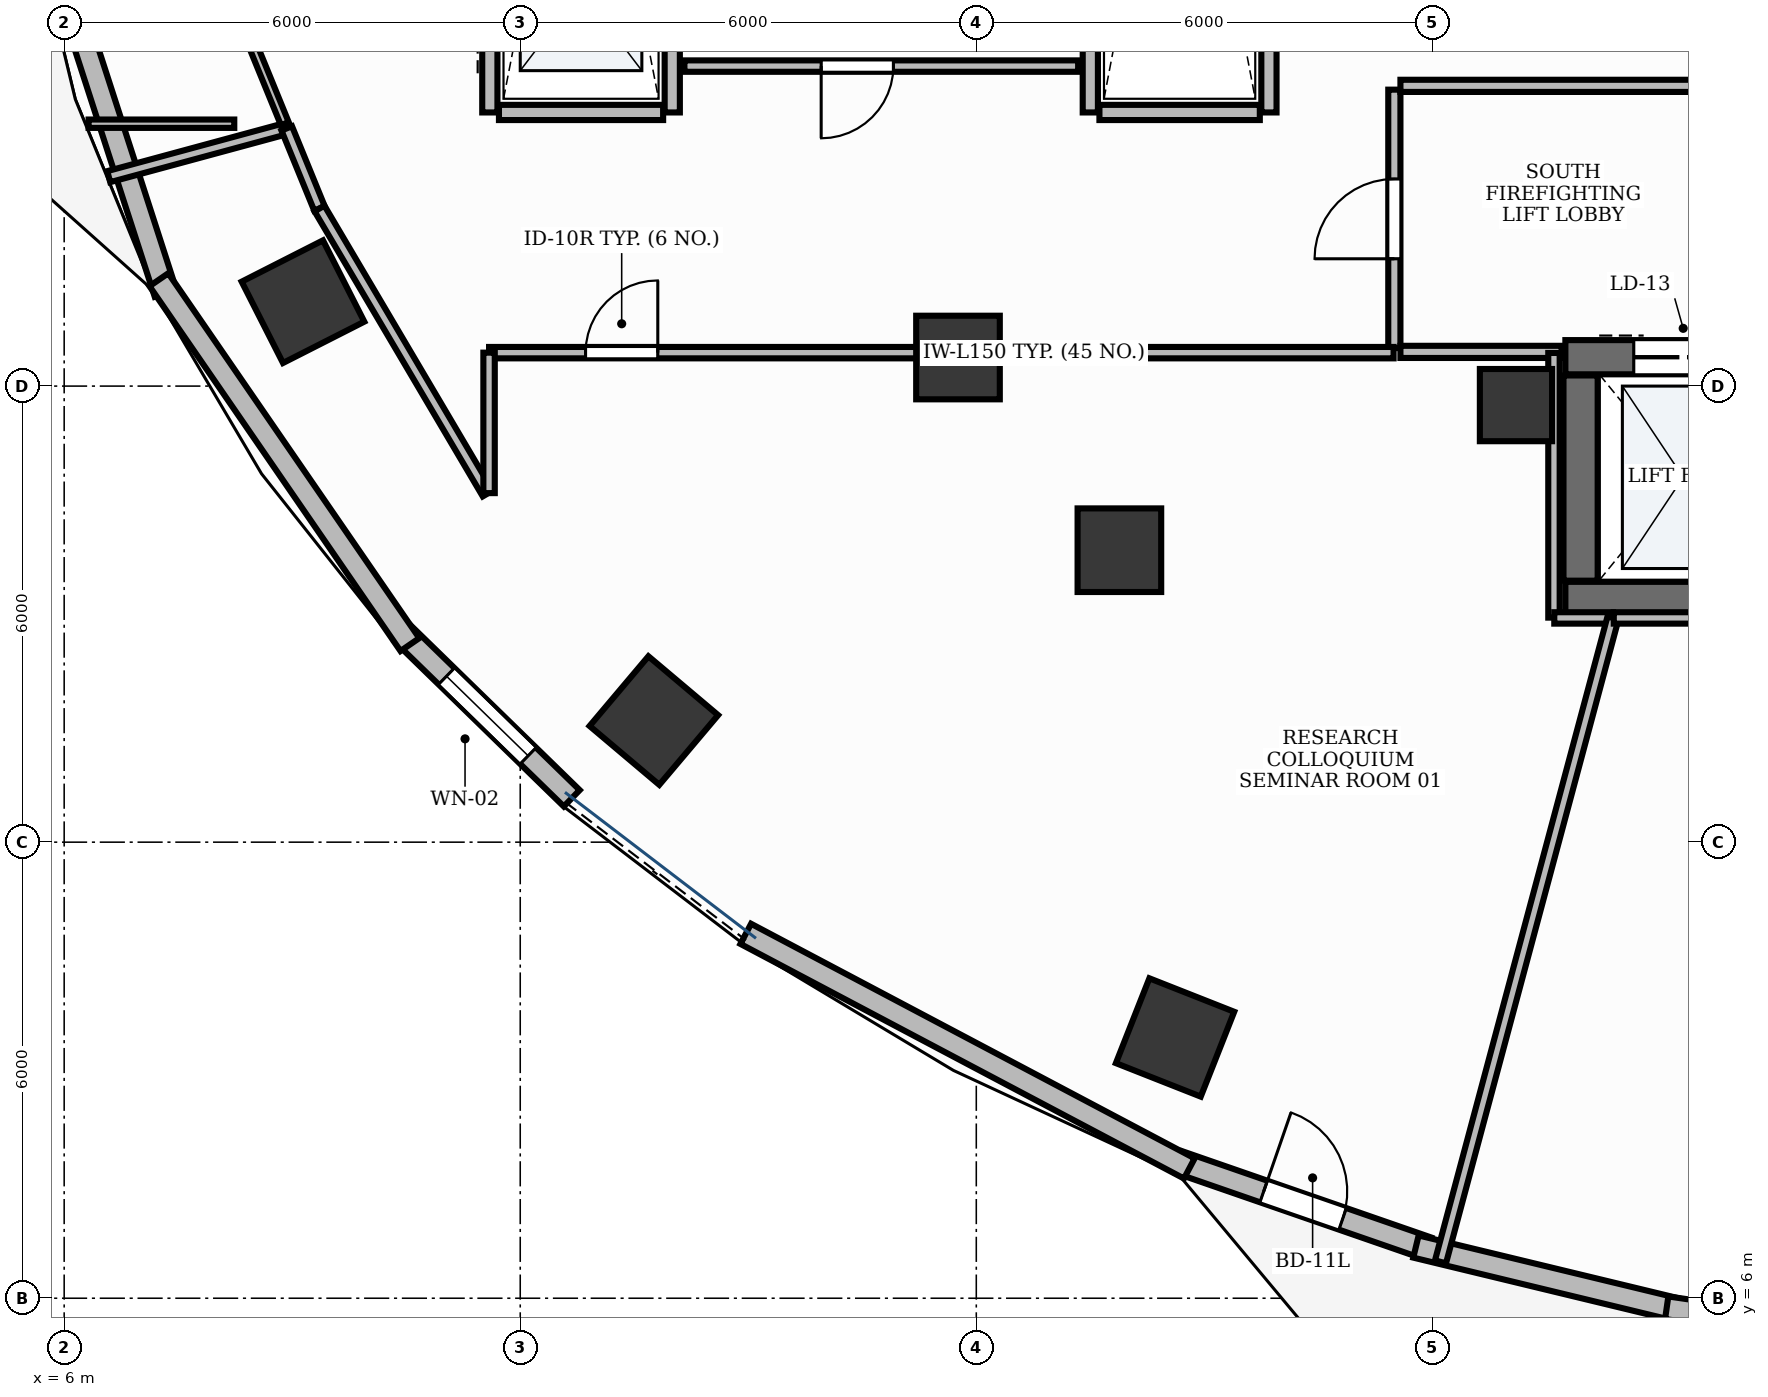
"""IFC4 building model, lengths in metres.
Left out: names, types, materials, properties, quantities, classifications, styles, units other than length and angle.
Written with IfcOpenShell. Run it as: python <this file> out.ifc"""

import sys

from ifc_helpers import new_model, si_unit, direction, frame, frame_2d, origin, origin_2d, place, context, subcontext, project, spatial, rectangle, extrude, element, fill, save


model = new_model("IFC4")
c1 = context("Model", 3, precision=1e-05, world=origin(), true_north=direction((0.0, 1.0)))
c2 = subcontext(c1, "Body", "Model", "MODEL_VIEW")
j1 = project(units=[si_unit("LENGTHUNIT", "METRE"), si_unit("PLANEANGLEUNIT", "RADIAN")], contexts=[c1])
p1 = place(None, origin())
s1 = spatial("IfcSite", under=j1, at=p1, CompositionType="ELEMENT")
p2 = place(p1, origin())
s2 = spatial("IfcBuilding", under=s1, at=p2, CompositionType="ELEMENT")
p3 = place(p2, frame((0.0, 0.0, 106.8)))
s3 = spatial("IfcBuildingStorey", under=s2, at=p3, CompositionType="ELEMENT", Elevation=106.8)
p4 = place(p3, frame((25.75, 15.2, 0.0), z_axis=(0.0, 0.0, 1.0), x_axis=(1.0, 0.0, 0.0)))
e1 = element("IfcWall", 1, at=p4, inside=s3, PredefinedType="SHEAR", context=c2, shape_type="SweptSolid", body=[
    extrude(rectangle(XDim=3.1, YDim=0.45, at=frame_2d((1.55, 0.0))), origin(), (0.0, 0.0, 1.0), 3.9),
])
p5 = place(p3, frame((25.75, 18.38, 0.0), z_axis=(0.0, 0.0, 1.0), x_axis=(1.0, 0.0, 0.0)))
e2 = element("IfcWall", 2, at=p5, inside=s3, PredefinedType="SHEAR", context=c2, shape_type="SweptSolid", body=[
    extrude(rectangle(XDim=3.1, YDim=0.45, at=frame_2d((1.55, 0.0))), origin(), (0.0, 0.0, 1.0), 3.9),
])
p6 = place(p5, frame((0.9, 0.0, 0.0)))
e3 = element("IfcOpeningElement", 3, at=p6, cuts=e2, PredefinedType="OPENING", context=c2, shape_type="SweptSolid", body=[
    extrude(rectangle(XDim=1.3, YDim=2.2, at=frame_2d((0.65, 1.1))), frame((0.0, 0.24, 0.0), z_axis=(0.0, -1.0, 0.0), x_axis=(1.0, 0.0, 0.0)), (0.0, 0.0, 1.0), 0.48),
])
p7 = place(p3, frame((25.95, 15.44, 0.0), z_axis=(0.0, 0.0, 1.0), x_axis=(0.0, 1.0, 0.0)))
e4 = element("IfcWall", 4, at=p7, inside=s3, PredefinedType="SHEAR", context=c2, shape_type="SweptSolid", body=[
    extrude(rectangle(XDim=2.7, YDim=0.45, at=frame_2d((1.35, 0.0))), origin(), (0.0, 0.0, 1.0), 3.9),
])
p8 = place(p3, frame((25.1, 17.75, -0.0), z_axis=(0.0, 0.0, 1.0), x_axis=(1.0, 0.0, 0.0)))
e5 = element("IfcColumn", 5, at=p8, inside=s3, PredefinedType="PILASTER", context=c2, shape_type="SweptSolid", body=[
    extrude(rectangle(XDim=0.95, YDim=0.95, at=origin_2d()), origin(), (0.0, 0.0, 1.0), 3.901),
])
p9 = place(p3, frame((9.142, 19.111, -0.0), z_axis=(0.0, 0.0, 1.0), x_axis=(-0.453057191132, 0.891481453292, 0.0)))
e6 = element("IfcColumn", 6, at=p9, inside=s3, PredefinedType="COLUMN", context=c2, shape_type="SweptSolid", body=[
    extrude(rectangle(XDim=1.2, YDim=1.2, at=origin_2d()), origin(), (0.0, 0.0, 1.0), 3.901),
])
p10 = place(p3, frame((17.759, 18.376, -0.0), z_axis=(0.0, 0.0, 1.0), x_axis=(1.0, 0.0, 0.0)))
e7 = element("IfcColumn", 7, at=p10, inside=s3, PredefinedType="COLUMN", context=c2, shape_type="SweptSolid", body=[
    extrude(rectangle(XDim=1.1, YDim=1.1, at=origin_2d()), origin(), (0.0, 0.0, 1.0), 3.901),
])
p11 = place(p3, frame((13.758, 13.6, -0.0), z_axis=(0.0, 0.0, 1.0), x_axis=(-0.764246456939, 0.644924300253, 0.0)))
e8 = element("IfcColumn", 8, at=p11, inside=s3, PredefinedType="COLUMN", context=c2, shape_type="SweptSolid", body=[
    extrude(rectangle(XDim=1.2, YDim=1.2, at=origin_2d()), origin(), (0.0, 0.0, 1.0), 3.901),
])
p12 = place(p3, frame((19.883, 15.841, -0.0), z_axis=(0.0, 0.0, 1.0), x_axis=(1.0, 0.0, 0.0)))
e9 = element("IfcColumn", 9, at=p12, inside=s3, PredefinedType="COLUMN", context=c2, shape_type="SweptSolid", body=[
    extrude(rectangle(XDim=1.1, YDim=1.1, at=origin_2d()), origin(), (0.0, 0.0, 1.0), 3.901),
])
p13 = place(p3, frame((20.615, 9.431, -0.0), z_axis=(0.0, 0.0, 1.0), x_axis=(-0.930225540858, 0.366988341962, 0.0)))
e10 = element("IfcColumn", 10, at=p13, inside=s3, PredefinedType="COLUMN", context=c2, shape_type="SweptSolid", body=[
    extrude(rectangle(XDim=1.2, YDim=1.2, at=origin_2d()), origin(), (0.0, 0.0, 1.0), 3.901),
])
p14 = place(p3, frame((10.456, 14.743, 0.0), z_axis=(0.0, 0.0, 1.0), x_axis=(0.716099460419, -0.697998254144, 0.0)))
e11 = element("IfcWall", 11, at=p14, inside=s3, PredefinedType="STANDARD", context=c2, shape_type="SweptSolid", body=[
    extrude(rectangle(XDim=3.102, YDim=0.3, at=frame_2d((1.551, 0.0))), origin(), (0.0, 0.0, 1.0), 3.9),
])
p15 = place(p14, frame((0.801, 0.0, 0.95)))
e12 = element("IfcOpeningElement", 12, at=p15, cuts=e11, PredefinedType="OPENING", context=c2, shape_type="SweptSolid", body=[
    extrude(rectangle(XDim=1.5, YDim=1.8, at=frame_2d((0.75, 0.9))), frame((0.0, 0.165, 0.0), z_axis=(0.0, -1.0, 0.0), x_axis=(1.0, 0.0, 0.0)), (0.0, 0.0, 1.0), 0.33),
])
p16 = place(p3, frame((20.662, 7.792, 0.0), z_axis=(0.0, 0.0, 1.0), x_axis=(0.944878029854, -0.3274225232, 0.0)))
e13 = element("IfcWall", 13, at=p16, inside=s3, PredefinedType="STANDARD", context=c2, shape_type="SweptSolid", body=[
    extrude(rectangle(XDim=3.467, YDim=0.3, at=frame_2d((1.734, 0.0))), origin(), (0.0, 0.0, 1.0), 3.47),
])
p17 = place(p16, frame((1.184, 0.0, 0.0)))
e14 = element("IfcOpeningElement", 14, at=p17, cuts=e13, PredefinedType="OPENING", context=c2, shape_type="SweptSolid", body=[
    extrude(rectangle(XDim=1.1, YDim=2.15, at=frame_2d((0.55, 1.075))), frame((0.0, 0.165, 0.0), z_axis=(0.0, -1.0, 0.0), x_axis=(1.0, 0.0, 0.0)), (0.0, 0.0, 1.0), 0.33),
])
p18 = place(p3, frame((5.632, 24.487, 0.0), z_axis=(0.0, 0.0, 1.0), x_axis=(0.307599470659, -0.951515930319, 0.0)))
e15 = element("IfcWall", 15, at=p18, inside=s3, PredefinedType="STANDARD", context=c2, shape_type="SweptSolid", body=[
    extrude(rectangle(XDim=5.534, YDim=0.3, at=frame_2d((2.767, 0.0))), origin(), (0.0, 0.0, 1.0), 3.9),
])
p19 = place(p3, frame((7.246, 19.399, 0.0), z_axis=(0.0, 0.0, 1.0), x_axis=(0.566825798999, -0.823837674296, 0.0)))
e16 = element("IfcWall", 16, at=p19, inside=s3, PredefinedType="STANDARD", context=c2, shape_type="SweptSolid", body=[
    extrude(rectangle(XDim=5.826, YDim=0.3, at=frame_2d((2.913, 0.0))), origin(), (0.0, 0.0, 1.0), 3.9),
])
p20 = place(p3, frame((14.967, 10.794, 0.0), z_axis=(0.0, 0.0, 1.0), x_axis=(0.883986649445, -0.467512142734, 0.0)))
e17 = element("IfcWall", 17, at=p20, inside=s3, PredefinedType="STANDARD", context=c2, shape_type="SweptSolid", body=[
    extrude(rectangle(XDim=6.601, YDim=0.3, at=frame_2d((3.301, 0.0))), origin(), (0.0, 0.0, 1.0), 3.9),
])
p21 = place(p3, frame((23.784, 6.68, 0.0), z_axis=(0.0, 0.0, 1.0), x_axis=(0.972043452321, -0.234801036625, 0.0)))
e18 = element("IfcWall", 18, at=p21, inside=s3, PredefinedType="STANDARD", context=c2, shape_type="SweptSolid", body=[
    extrude(rectangle(XDim=3.569, YDim=0.3, at=frame_2d((1.784, 0.0))), origin(), (0.0, 0.0, 1.0), 3.9),
])
p22 = place(p3, frame((27.083, 5.875, 0.0), z_axis=(0.0, 0.0, 1.0), x_axis=(0.989734732902, -0.142916613754, 0.0)))
e19 = element("IfcWall", 19, at=p22, inside=s3, PredefinedType="STANDARD", context=c2, shape_type="SweptSolid", body=[
    extrude(rectangle(XDim=3.611, YDim=0.3, at=frame_2d((1.806, 0.0))), origin(), (0.0, 0.0, 1.0), 3.47),
])
p23 = place(p3, frame((11.6, 21.6, 0.0), z_axis=(0.0, 0.0, 1.0), x_axis=(0.0, 1.0, 0.0)))
e20 = element("IfcWall", 20, at=p23, inside=s3, PredefinedType="PARTITIONING", context=c2, shape_type="SweptSolid", body=[
    extrude(rectangle(XDim=10.8, YDim=0.2, at=frame_2d((5.4, 0.0))), origin(), (0.0, 0.0, 1.0), 2.91),
])
p24 = place(p23, frame((0.9, 0.0, 0.0)))
e21 = element("IfcOpeningElement", 21, at=p24, cuts=e20, PredefinedType="OPENING", context=c2, shape_type="SweptSolid", body=[
    extrude(rectangle(XDim=1.1, YDim=2.2, at=frame_2d((0.55, 1.1))), frame((0.0, 0.115, 0.0), z_axis=(0.0, -1.0, 0.0), x_axis=(1.0, 0.0, 0.0)), (0.0, 0.0, 1.0), 0.23),
])
p25 = place(p23, frame((3.6, 0.0, 0.0)))
e22 = element("IfcOpeningElement", 22, at=p25, cuts=e20, PredefinedType="OPENING", context=c2, shape_type="SweptSolid", body=[
    extrude(rectangle(XDim=1.1, YDim=2.2, at=frame_2d((0.55, 1.1))), frame((0.0, 0.115, 0.0), z_axis=(0.0, -1.0, 0.0), x_axis=(1.0, 0.0, 0.0)), (0.0, 0.0, 1.0), 0.23),
])
p26 = place(p23, frame((6.3, 0.0, 0.0)))
e23 = element("IfcOpeningElement", 23, at=p26, cuts=e20, PredefinedType="OPENING", context=c2, shape_type="SweptSolid", body=[
    extrude(rectangle(XDim=1.1, YDim=2.2, at=frame_2d((0.55, 1.1))), frame((0.0, 0.115, 0.0), z_axis=(0.0, -1.0, 0.0), x_axis=(1.0, 0.0, 0.0)), (0.0, 0.0, 1.0), 0.23),
])
p27 = place(p23, frame((9.0, 0.0, 0.0)))
e24 = element("IfcOpeningElement", 24, at=p27, cuts=e20, PredefinedType="OPENING", context=c2, shape_type="SweptSolid", body=[
    extrude(rectangle(XDim=1.1, YDim=2.2, at=frame_2d((0.55, 1.1))), frame((0.0, 0.115, 0.0), z_axis=(0.0, -1.0, 0.0), x_axis=(1.0, 0.0, 0.0)), (0.0, 0.0, 1.0), 0.23),
])
p28 = place(p3, frame((14.0, 21.6, 0.0), z_axis=(0.0, 0.0, 1.0), x_axis=(0.0, 1.0, 0.0)))
e25 = element("IfcWall", 25, at=p28, inside=s3, PredefinedType="PARTITIONING", context=c2, shape_type="SweptSolid", body=[
    extrude(rectangle(XDim=10.8, YDim=0.2, at=frame_2d((5.4, 0.0))), origin(), (0.0, 0.0, 1.0), 2.91),
])
p29 = place(p3, frame((11.72, 21.6, 0.0), z_axis=(0.0, 0.0, 1.0), x_axis=(1.0, 0.0, 0.0)))
e26 = element("IfcWall", 26, at=p29, inside=s3, PredefinedType="PARTITIONING", context=c2, shape_type="SweptSolid", body=[
    extrude(rectangle(XDim=2.16, YDim=0.2, at=frame_2d((1.08, 0.0))), origin(), (0.0, 0.0, 1.0), 2.91),
])
for number, where, z_axis, x_axis in (
    (27, (19.5, 21.6, 0.0), (0.0, 0.0, 1.0), (0.0, 1.0, 0.0)),
    (28, (21.85, 21.6, 0.0), (0.0, 0.0, 1.0), (0.0, 1.0, 0.0)),
):
    element("IfcWall", number, at=place(p3, frame(where, z_axis=z_axis, x_axis=x_axis)), inside=s3, PredefinedType="PARTITIONING", context=c2, shape_type="SweptSolid", body=[
        extrude(rectangle(XDim=10.8, YDim=0.2, at=frame_2d((5.4, 0.0))), origin(), (0.0, 0.0, 1.0), 2.91),
    ])
p30 = place(p3, frame((19.62, 21.6, 0.0), z_axis=(0.0, 0.0, 1.0), x_axis=(1.0, 0.0, 0.0)))
e29 = element("IfcWall", 29, at=p30, inside=s3, PredefinedType="PARTITIONING", context=c2, shape_type="SweptSolid", body=[
    extrude(rectangle(XDim=2.11, YDim=0.2, at=frame_2d((1.055, 0.0))), origin(), (0.0, 0.0, 1.0), 2.91),
])
p31 = place(p3, frame((23.5, 18.5, 0.0), z_axis=(0.0, 0.0, 1.0), x_axis=(0.0, 1.0, 0.0)))
e30 = element("IfcWall", 30, at=p31, inside=s3, PredefinedType="PARTITIONING", context=c2, shape_type="SweptSolid", body=[
    extrude(rectangle(XDim=3.4, YDim=0.16, at=frame_2d((1.7, 0.0))), origin(), (0.0, 0.0, 1.0), 2.91),
])
p32 = place(p31, frame((1.175, 0.0, 0.0)))
e31 = element("IfcOpeningElement", 31, at=p32, cuts=e30, PredefinedType="OPENING", context=c2, shape_type="SweptSolid", body=[
    extrude(rectangle(XDim=1.05, YDim=2.15, at=frame_2d((0.525, 1.075))), frame((0.0, 0.095, 0.0), z_axis=(0.0, -1.0, 0.0), x_axis=(1.0, 0.0, 0.0)), (0.0, 0.0, 1.0), 0.19),
])
p33 = place(p3, frame((23.58, 21.95, 0.0), z_axis=(0.0, 0.0, 1.0), x_axis=(1.0, 0.0, 0.0)))
e32 = element("IfcWall", 32, at=p33, inside=s3, PredefinedType="PARTITIONING", context=c2, shape_type="SweptSolid", body=[
    extrude(rectangle(XDim=4.97, YDim=0.16, at=frame_2d((2.485, 0.0))), origin(), (0.0, 0.0, 1.0), 2.91),
])
p34 = place(p3, frame((23.58, 18.45, 0.0), z_axis=(0.0, 0.0, 1.0), x_axis=(1.0, 0.0, 0.0)))
e33 = element("IfcWall", 33, at=p34, inside=s3, PredefinedType="PARTITIONING", context=c2, shape_type="SweptSolid", body=[
    extrude(rectangle(XDim=2.12, YDim=0.16, at=frame_2d((1.06, 0.0))), origin(), (0.0, 0.0, 1.0), 2.91),
])
p35 = place(p3, frame((11.59, 18.44, 0.0), z_axis=(0.0, 0.0, 1.0), x_axis=(1.0, 0.0, 0.0)))
e34 = element("IfcWall", 34, at=p35, inside=s3, PredefinedType="PARTITIONING", context=c2, shape_type="SweptSolid", body=[
    extrude(rectangle(XDim=11.9, YDim=0.15, at=frame_2d((5.95, 0.0))), origin(), (0.0, 0.0, 1.0), 2.91),
])
p36 = place(p35, frame((1.27, 0.0, 0.0)))
e35 = element("IfcOpeningElement", 35, at=p36, cuts=e34, PredefinedType="OPENING", context=c2, shape_type="SweptSolid", body=[
    extrude(rectangle(XDim=0.95, YDim=2.15, at=frame_2d((0.475, 1.075))), frame((0.0, 0.09, 0.0), z_axis=(0.0, -1.0, 0.0), x_axis=(1.0, 0.0, 0.0)), (0.0, 0.0, 1.0), 0.18),
])
p37 = place(p3, frame((19.34, 22.21, 0.0), z_axis=(0.0, 0.0, 1.0), x_axis=(-1.0, 0.0, 0.0)))
e36 = element("IfcWall", 36, at=p37, inside=s3, PredefinedType="PARTITIONING", context=c2, shape_type="SweptSolid", body=[
    extrude(rectangle(XDim=5.18, YDim=0.15, at=frame_2d((2.59, 0.0))), origin(), (0.0, 0.0, 1.0), 2.91),
])
p38 = place(p37, frame((2.431, 0.0, 0.0)))
e37 = element("IfcOpeningElement", 37, at=p38, cuts=e36, PredefinedType="OPENING", context=c2, shape_type="SweptSolid", body=[
    extrude(rectangle(XDim=0.95, YDim=2.15, at=frame_2d((0.475, 1.075))), frame((0.0, 0.09, 0.0), z_axis=(0.0, -1.0, 0.0), x_axis=(1.0, 0.0, 0.0)), (0.0, 0.0, 1.0), 0.18),
])
p39 = place(p3, frame((6.586, 20.756, 0.0), z_axis=(0.0, 0.0, 1.0), x_axis=(0.965171339766, 0.261618586676, 0.0)))
e38 = element("IfcWall", 38, at=p39, inside=s3, PredefinedType="PARTITIONING", context=c2, shape_type="SweptSolid", body=[
    extrude(rectangle(XDim=2.426, YDim=0.15, at=frame_2d((1.213, 0.0))), origin(), (0.0, 0.0, 1.0), 2.91),
])
p40 = place(p3, frame((8.928, 21.39, 0.0), z_axis=(0.0, 0.0, 1.0), x_axis=(0.378373768339, -0.925652900083, 0.0)))
e39 = element("IfcWall", 39, at=p40, inside=s3, PredefinedType="PARTITIONING", context=c2, shape_type="SweptSolid", body=[
    extrude(rectangle(XDim=1.137, YDim=0.15, at=frame_2d((0.569, 0.0))), origin(), (0.0, 0.0, 1.0), 2.91),
])
p41 = place(p3, frame((9.359, 20.336, 0.0), z_axis=(0.0, 0.0, 1.0), x_axis=(0.508164254342, -0.86126017591, 0.0)))
e40 = element("IfcWall", 40, at=p41, inside=s3, PredefinedType="PARTITIONING", context=c2, shape_type="SweptSolid", body=[
    extrude(rectangle(XDim=4.353, YDim=0.15, at=frame_2d((2.177, 0.0))), origin(), (0.0, 0.0, 1.0), 2.91),
])
p42 = place(p3, frame((11.59, 16.592, 0.0), z_axis=(0.0, 0.0, 1.0), x_axis=(0.0, 1.0, 0.0)))
e41 = element("IfcWall", 41, at=p42, inside=s3, PredefinedType="PARTITIONING", context=c2, shape_type="SweptSolid", body=[
    extrude(rectangle(XDim=1.848, YDim=0.15, at=frame_2d((0.924, 0.0))), origin(), (0.0, 0.0, 1.0), 2.91),
])
p43 = place(p3, frame((25.6, 18.436, 0.0), z_axis=(0.0, 0.0, 1.0), x_axis=(0.0, -1.0, 0.0)))
e42 = element("IfcWall", 42, at=p43, inside=s3, PredefinedType="PARTITIONING", context=c2, shape_type="SweptSolid", body=[
    extrude(rectangle(XDim=3.482, YDim=0.15, at=frame_2d((1.741, 0.0))), origin(), (0.0, 0.0, 1.0), 2.91),
])
p44 = place(p3, frame((25.604, 14.95, 0.0), z_axis=(0.0, 0.0, 1.0), x_axis=(1.0, 0.0, 0.0)))
e43 = element("IfcWall", 43, at=p44, inside=s3, PredefinedType="PARTITIONING", context=c2, shape_type="SweptSolid", body=[
    extrude(rectangle(XDim=0.773, YDim=0.15, at=frame_2d((0.386, 0.0))), origin(), (0.0, 0.0, 1.0), 2.91),
])
p45 = place(p3, frame((26.377, 14.95, 0.0), z_axis=(0.0, 0.0, 1.0), x_axis=(-0.258811225067, -0.965927921627, 0.0)))
e44 = element("IfcWall", 44, at=p45, inside=s3, PredefinedType="PARTITIONING", context=c2, shape_type="SweptSolid", body=[
    extrude(rectangle(XDim=8.77, YDim=0.15, at=frame_2d((4.385, 0.0))), origin(), (0.0, 0.0, 1.0), 2.91),
])
p46 = place(p3, frame((26.387, 14.95, 0.0), z_axis=(0.0, 0.0, 1.0), x_axis=(1.0, 0.0, 0.0)))
e45 = element("IfcWall", 45, at=p46, inside=s3, PredefinedType="PARTITIONING", context=c2, shape_type="SweptSolid", body=[
    extrude(rectangle(XDim=2.609, YDim=0.15, at=frame_2d((1.305, 0.0))), origin(), (0.0, 0.0, 1.0), 2.91),
])
p47 = place(p3, frame((8.466, 22.52, 0.0), z_axis=(0.0, 0.0, 1.0), x_axis=(0.378237433206, -0.925708617288, 0.0)))
e46 = element("IfcWall", 46, at=p47, inside=s3, PredefinedType="MOVABLE", context=c2, shape_type="SweptSolid", body=[
    extrude(rectangle(XDim=1.154, YDim=0.11, at=frame_2d((0.577, 0.0))), origin(), (0.0, 0.0, 1.0), 2.91),
])
p48 = place(p3, frame((8.238, 21.452, 0.0), z_axis=(0.0, 0.0, 1.0), x_axis=(-1.0, 0.0, 0.0)))
e47 = element("IfcWall", 47, at=p48, inside=s3, PredefinedType="MOVABLE", context=c2, shape_type="SweptSolid", body=[
    extrude(rectangle(XDim=1.917, YDim=0.11, at=frame_2d((0.958, 0.0))), origin(), (0.0, 0.0, 1.0), 2.91),
])
p49 = place(p15, origin())
e48 = element("IfcWindow", 48, at=p49, inside=s3, PartitioningType="DOUBLE_PANEL_VERTICAL", PredefinedType="WINDOW", context=c2, shape_type="SweptSolid", body=[
    extrude(rectangle(XDim=1.5, YDim=1.8, at=frame_2d((0.75, 0.9))), frame((0.0, 0.03, 0.0), z_axis=(0.0, -1.0, 0.0), x_axis=(1.0, 0.0, 0.0)), (0.0, 0.0, 1.0), 0.06),
])
fill(e12, e48)
p50 = place(p17, origin())
e49 = element("IfcDoor", 49, at=p50, inside=s3, OperationType="SINGLE_SWING_LEFT", PredefinedType="DOOR", context=c2, shape_type="SweptSolid", body=[
    extrude(rectangle(XDim=1.1, YDim=2.15, at=frame_2d((0.55, 1.075))), frame((0.0, 0.025, 0.0), z_axis=(0.0, -1.0, 0.0), x_axis=(1.0, 0.0, 0.0)), (0.0, 0.0, 1.0), 0.05),
])
fill(e14, e49)
p51 = place(p6, origin())
e50 = element("IfcDoor", 50, at=p51, inside=s3, OperationType="DOUBLE_DOOR_SLIDING", PredefinedType="DOOR", context=c2, shape_type="SweptSolid", body=[
    extrude(rectangle(XDim=1.3, YDim=2.2, at=frame_2d((0.65, 1.1))), frame((0.0, 0.025, 0.0), z_axis=(0.0, -1.0, 0.0), x_axis=(1.0, 0.0, 0.0)), (0.0, 0.0, 1.0), 0.05),
])
fill(e3, e50)
p52 = place(p32, origin())
e51 = element("IfcDoor", 51, at=p52, inside=s3, OperationType="SINGLE_SWING_LEFT", PredefinedType="DOOR", context=c2, shape_type="SweptSolid", body=[
    extrude(rectangle(XDim=1.05, YDim=2.15, at=frame_2d((0.525, 1.075))), frame((0.0, 0.025, 0.0), z_axis=(0.0, -1.0, 0.0), x_axis=(1.0, 0.0, 0.0)), (0.0, 0.0, 1.0), 0.05),
])
fill(e31, e51)
p53 = place(p36, origin())
e52 = element("IfcDoor", 52, at=p53, inside=s3, OperationType="SINGLE_SWING_RIGHT", PredefinedType="DOOR", context=c2, shape_type="SweptSolid", body=[
    extrude(rectangle(XDim=0.95, YDim=2.15, at=frame_2d((0.475, 1.075))), frame((0.0, 0.025, 0.0), z_axis=(0.0, -1.0, 0.0), x_axis=(1.0, 0.0, 0.0)), (0.0, 0.0, 1.0), 0.05),
])
fill(e35, e52)
p54 = place(p38, origin())
e53 = element("IfcDoor", 53, at=p54, inside=s3, OperationType="SINGLE_SWING_RIGHT", PredefinedType="DOOR", context=c2, shape_type="SweptSolid", body=[
    extrude(rectangle(XDim=0.95, YDim=2.15, at=frame_2d((0.475, 1.075))), frame((0.0, 0.025, 0.0), z_axis=(0.0, -1.0, 0.0), x_axis=(1.0, 0.0, 0.0)), (0.0, 0.0, 1.0), 0.05),
])
fill(e37, e53)
save(model, sys.argv[1])
